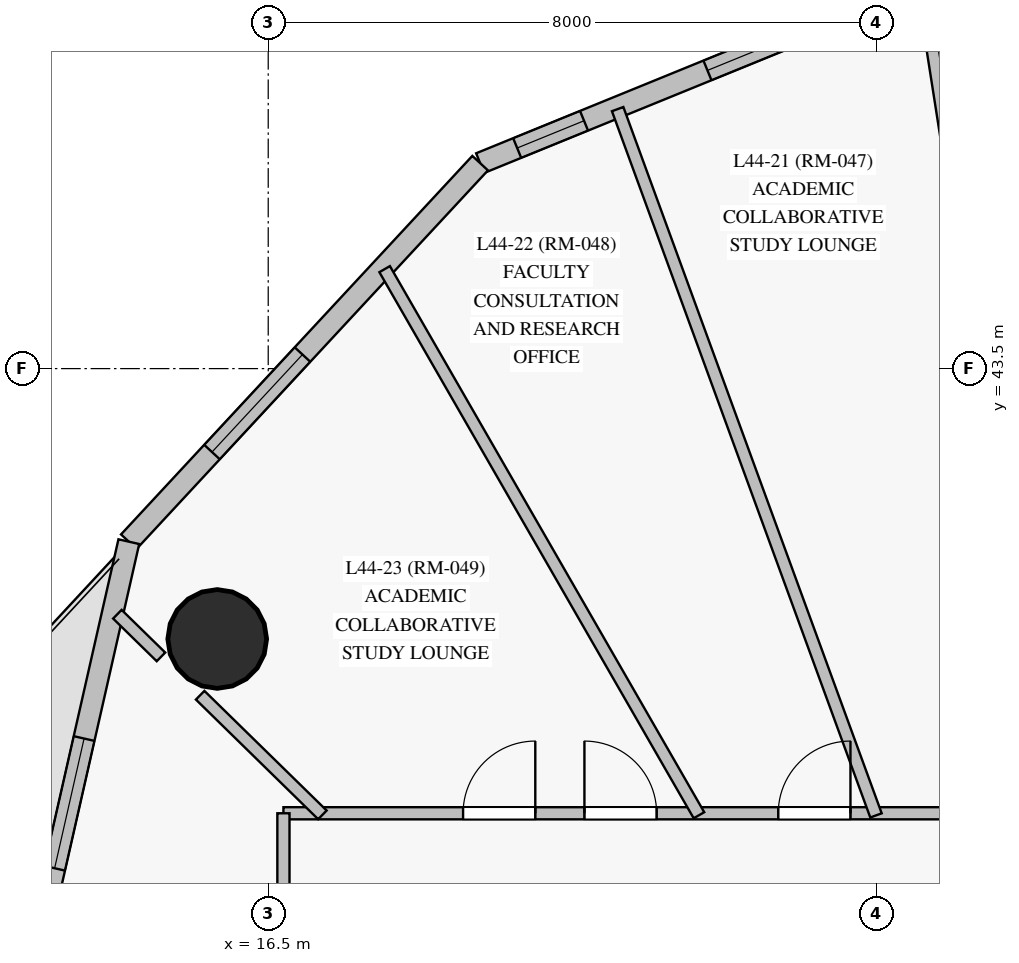
"""IFC4 building model, lengths in metres.
Left out: names, types, materials, properties, quantities, classifications, styles, units other than length and angle.
Written with IfcOpenShell. Run it as: python <this file> out.ifc"""

import sys

from ifc_helpers import new_model, si_unit, direction, frame, frame_2d, origin, origin_with_axes, origin_2d, place, context, subcontext, project, spatial, rectangle, circle, extrude, source, transform, mapped, element, fill, save


model = new_model("IFC4")
c1 = context("Model", 3, precision=1e-05, world=origin(), true_north=direction((0.0, 1.0)))
c2 = subcontext(c1, "Body", "Model", "MODEL_VIEW")
j1 = project(units=[si_unit("LENGTHUNIT", "METRE"), si_unit("PLANEANGLEUNIT", "RADIAN")], contexts=[c1])
p1 = place(None, origin())
s1 = spatial("IfcSite", under=j1, at=p1, CompositionType="ELEMENT")
p2 = place(p1, origin())
s2 = spatial("IfcBuilding", under=s1, at=p2, CompositionType="ELEMENT")
p3 = place(p2, frame((0.0, 0.0, 156.55)))
s3 = spatial("IfcBuildingStorey", under=s2, at=p3, CompositionType="ELEMENT", Elevation=156.55)
m1 = source(origin_with_axes(), c2, "Body", "SweptSolid", [
    extrude(circle(Radius=0.65, at=origin_2d()), origin(), (0.0, 0.0, 1.0), 3.05),
])
p4 = place(p3, frame((15.829, 39.943, 0.0), z_axis=(0.0, 0.0, 1.0), x_axis=(1.0, 0.0, 0.0)))
e1 = element("IfcColumn", 1, at=p4, inside=s3, PredefinedType="COLUMN", context=c2, shape_type="MappedRepresentation", body=[
    mapped(m1, transform((0.0, 0.0, 0.0), scale=1.0)),
])
p5 = place(p3, frame((28.053, 49.778, 0.0), z_axis=(0.0, 0.0, 1.0), x_axis=(-0.925936748152, -0.377678617903, 0.0)))
e2 = element("IfcWall", 2, at=p5, inside=s3, PredefinedType="SOLIDWALL", context=c2, shape_type="SweptSolid", body=[
    extrude(rectangle(XDim=9.466, YDim=0.28, at=frame_2d((4.733, 0.0))), origin(), (0.0, 0.0, 1.0), 2.825),
])
p6 = place(p5, frame((0.754, 0.0, 0.85)))
e3 = element("IfcOpeningElement", 3, at=p6, cuts=e2, PredefinedType="OPENING", context=c2, shape_type="SweptSolid", body=[
    extrude(rectangle(XDim=1.75, YDim=1.65, at=frame_2d((0.875, 0.825))), frame((0.0, 0.15, 0.0), z_axis=(0.0, -1.0, 0.0), x_axis=(1.0, 0.0, 0.0)), (0.0, 0.0, 1.0), 0.3),
])
p7 = place(p5, frame((4.486, 0.0, 0.85)))
e4 = element("IfcOpeningElement", 4, at=p7, cuts=e2, PredefinedType="OPENING", context=c2, shape_type="SweptSolid", body=[
    extrude(rectangle(XDim=1.75, YDim=1.65, at=frame_2d((0.875, 0.825))), frame((0.0, 0.15, 0.0), z_axis=(0.0, -1.0, 0.0), x_axis=(1.0, 0.0, 0.0)), (0.0, 0.0, 1.0), 0.3),
])
p8 = place(p5, frame((7.99, 0.0, 0.85)))
e5 = element("IfcOpeningElement", 5, at=p8, cuts=e2, PredefinedType="OPENING", context=c2, shape_type="SweptSolid", body=[
    extrude(rectangle(XDim=0.95, YDim=1.5, at=frame_2d((0.475, 0.75))), frame((0.0, 0.15, 0.0), z_axis=(0.0, -1.0, 0.0), x_axis=(1.0, 0.0, 0.0)), (0.0, 0.0, 1.0), 0.3),
])
p9 = place(p3, frame((19.288, 46.203, 0.0), z_axis=(0.0, 0.0, 1.0), x_axis=(-0.680295338819, -0.7329380956, 0.0)))
e6 = element("IfcWall", 6, at=p9, inside=s3, PredefinedType="SOLIDWALL", context=c2, shape_type="SweptSolid", body=[
    extrude(rectangle(XDim=6.794, YDim=0.28, at=frame_2d((3.397, 0.0))), origin(), (0.0, 0.0, 1.0), 2.825),
])
p10 = place(p9, frame((3.436, 0.0, 0.85)))
e7 = element("IfcOpeningElement", 7, at=p10, cuts=e6, PredefinedType="OPENING", context=c2, shape_type="SweptSolid", body=[
    extrude(rectangle(XDim=1.75, YDim=1.65, at=frame_2d((0.875, 0.825))), frame((0.0, 0.15, 0.0), z_axis=(0.0, -1.0, 0.0), x_axis=(1.0, 0.0, 0.0)), (0.0, 0.0, 1.0), 0.3),
])
p11 = place(p3, frame((14.666, 41.223, 0.0), z_axis=(0.0, 0.0, 1.0), x_axis=(-0.221558962352, -0.975146976718, 0.0)))
e8 = element("IfcWall", 8, at=p11, inside=s3, PredefinedType="SOLIDWALL", context=c2, shape_type="SweptSolid", body=[
    extrude(rectangle(XDim=22.585, YDim=0.28, at=frame_2d((11.292, 0.0))), origin(), (0.0, 0.0, 1.0), 2.825),
])
p12 = place(p11, frame((2.656, 0.0, 0.85)))
e9 = element("IfcOpeningElement", 9, at=p12, cuts=e8, PredefinedType="OPENING", context=c2, shape_type="SweptSolid", body=[
    extrude(rectangle(XDim=1.75, YDim=1.65, at=frame_2d((0.875, 0.825))), frame((0.0, 0.15, 0.0), z_axis=(0.0, -1.0, 0.0), x_axis=(1.0, 0.0, 0.0)), (0.0, 0.0, 1.0), 0.3),
])
p13 = place(p11, frame((7.15, 0.0, 0.85)))
e10 = element("IfcOpeningElement", 10, at=p13, cuts=e8, PredefinedType="OPENING", context=c2, shape_type="SweptSolid", body=[
    extrude(rectangle(XDim=1.75, YDim=1.65, at=frame_2d((0.875, 0.825))), frame((0.0, 0.15, 0.0), z_axis=(0.0, -1.0, 0.0), x_axis=(1.0, 0.0, 0.0)), (0.0, 0.0, 1.0), 0.3),
])
p14 = place(p11, frame((11.643, 0.0, 0.85)))
e11 = element("IfcOpeningElement", 11, at=p14, cuts=e8, PredefinedType="OPENING", context=c2, shape_type="SweptSolid", body=[
    extrude(rectangle(XDim=1.75, YDim=1.65, at=frame_2d((0.875, 0.825))), frame((0.0, 0.15, 0.0), z_axis=(0.0, -1.0, 0.0), x_axis=(1.0, 0.0, 0.0)), (0.0, 0.0, 1.0), 0.3),
])
p15 = place(p11, frame((17.93, 0.0, 0.85)))
e12 = element("IfcOpeningElement", 12, at=p15, cuts=e8, PredefinedType="OPENING", context=c2, shape_type="SweptSolid", body=[
    extrude(rectangle(XDim=1.75, YDim=1.65, at=frame_2d((0.875, 0.825))), frame((0.0, 0.15, 0.0), z_axis=(0.0, -1.0, 0.0), x_axis=(1.0, 0.0, 0.0)), (0.0, 0.0, 1.0), 0.3),
])
p16 = place(p11, frame((9.826, 0.0, 0.0)))
e13 = element("IfcOpeningElement", 13, at=p16, cuts=e8, PredefinedType="OPENING", context=c2, shape_type="SweptSolid", body=[
    extrude(rectangle(XDim=1.05, YDim=2.12, at=frame_2d((0.525, 1.06))), frame((0.0, 0.15, 0.0), z_axis=(0.0, -1.0, 0.0), x_axis=(1.0, 0.0, 0.0)), (0.0, 0.0, 1.0), 0.3),
])
p17 = place(p3, frame((16.7, 37.65, 0.0), z_axis=(0.0, 0.0, 1.0), x_axis=(1.0, 0.0, 0.0)))
e14 = element("IfcWall", 14, at=p17, inside=s3, PredefinedType="PARTITIONING", context=c2, shape_type="SweptSolid", body=[
    extrude(rectangle(XDim=23.5, YDim=0.16, at=frame_2d((11.75, 0.0))), origin(), (0.0, 0.0, 1.0), 2.375),
])
p18 = place(p17, frame((21.26, 0.0, 0.0)))
e15 = element("IfcOpeningElement", 15, at=p18, cuts=e14, PredefinedType="OPENING", context=c2, shape_type="SweptSolid", body=[
    extrude(rectangle(XDim=0.95, YDim=2.15, at=frame_2d((0.475, 1.075))), frame((0.0, 0.09, 0.0), z_axis=(0.0, -1.0, 0.0), x_axis=(1.0, 0.0, 0.0)), (0.0, 0.0, 1.0), 0.18),
])
p19 = place(p17, frame((17.365, 0.0, 0.0)))
e16 = element("IfcOpeningElement", 16, at=p19, cuts=e14, PredefinedType="OPENING", context=c2, shape_type="SweptSolid", body=[
    extrude(rectangle(XDim=0.86, YDim=2.1, at=frame_2d((0.43, 1.05))), frame((0.0, 0.09, 0.0), z_axis=(0.0, -1.0, 0.0), x_axis=(1.0, 0.0, 0.0)), (0.0, 0.0, 1.0), 0.18),
])
p20 = place(p17, frame((15.16, 0.0, 0.0)))
e17 = element("IfcOpeningElement", 17, at=p20, cuts=e14, PredefinedType="OPENING", context=c2, shape_type="SweptSolid", body=[
    extrude(rectangle(XDim=0.95, YDim=2.15, at=frame_2d((0.475, 1.075))), frame((0.0, 0.09, 0.0), z_axis=(0.0, -1.0, 0.0), x_axis=(1.0, 0.0, 0.0)), (0.0, 0.0, 1.0), 0.18),
])
p21 = place(p17, frame((13.06, 0.0, 0.0)))
e18 = element("IfcOpeningElement", 18, at=p21, cuts=e14, PredefinedType="OPENING", context=c2, shape_type="SweptSolid", body=[
    extrude(rectangle(XDim=0.95, YDim=2.15, at=frame_2d((0.475, 1.075))), frame((0.0, 0.09, 0.0), z_axis=(0.0, -1.0, 0.0), x_axis=(1.0, 0.0, 0.0)), (0.0, 0.0, 1.0), 0.18),
])
p22 = place(p17, frame((10.973, 0.0, 0.0)))
e19 = element("IfcOpeningElement", 19, at=p22, cuts=e14, PredefinedType="OPENING", context=c2, shape_type="SweptSolid", body=[
    extrude(rectangle(XDim=0.95, YDim=2.15, at=frame_2d((0.475, 1.075))), frame((0.0, 0.09, 0.0), z_axis=(0.0, -1.0, 0.0), x_axis=(1.0, 0.0, 0.0)), (0.0, 0.0, 1.0), 0.18),
])
p23 = place(p17, frame((8.885, 0.0, 0.0)))
e20 = element("IfcOpeningElement", 20, at=p23, cuts=e14, PredefinedType="OPENING", context=c2, shape_type="SweptSolid", body=[
    extrude(rectangle(XDim=0.95, YDim=2.15, at=frame_2d((0.475, 1.075))), frame((0.0, 0.09, 0.0), z_axis=(0.0, -1.0, 0.0), x_axis=(1.0, 0.0, 0.0)), (0.0, 0.0, 1.0), 0.18),
])
p24 = place(p17, frame((6.51, 0.0, 0.0)))
e21 = element("IfcOpeningElement", 21, at=p24, cuts=e14, PredefinedType="OPENING", context=c2, shape_type="SweptSolid", body=[
    extrude(rectangle(XDim=0.95, YDim=2.15, at=frame_2d((0.475, 1.075))), frame((0.0, 0.09, 0.0), z_axis=(0.0, -1.0, 0.0), x_axis=(1.0, 0.0, 0.0)), (0.0, 0.0, 1.0), 0.18),
])
p25 = place(p17, frame((3.96, 0.0, 0.0)))
e22 = element("IfcOpeningElement", 22, at=p25, cuts=e14, PredefinedType="OPENING", context=c2, shape_type="SweptSolid", body=[
    extrude(rectangle(XDim=0.95, YDim=2.15, at=frame_2d((0.475, 1.075))), frame((0.0, 0.09, 0.0), z_axis=(0.0, -1.0, 0.0), x_axis=(1.0, 0.0, 0.0)), (0.0, 0.0, 1.0), 0.18),
])
p26 = place(p17, frame((2.364, 0.0, 0.0)))
e23 = element("IfcOpeningElement", 23, at=p26, cuts=e14, PredefinedType="OPENING", context=c2, shape_type="SweptSolid", body=[
    extrude(rectangle(XDim=0.95, YDim=2.15, at=frame_2d((0.475, 1.075))), frame((0.0, 0.09, 0.0), z_axis=(0.0, -1.0, 0.0), x_axis=(1.0, 0.0, 0.0)), (0.0, 0.0, 1.0), 0.18),
])
p27 = place(p3, frame((16.7, 15.35, 0.0), z_axis=(0.0, 0.0, 1.0), x_axis=(0.0, 1.0, 0.0)))
e24 = element("IfcWall", 24, at=p27, inside=s3, PredefinedType="PARTITIONING", context=c2, shape_type="SweptSolid", body=[
    extrude(rectangle(XDim=22.3, YDim=0.16, at=frame_2d((11.15, 0.0))), origin(), (0.0, 0.0, 1.0), 2.275),
])
p28 = place(p27, frame((7.33, 0.0, 0.0)))
e25 = element("IfcOpeningElement", 25, at=p28, cuts=e24, PredefinedType="OPENING", context=c2, shape_type="SweptSolid", body=[
    extrude(rectangle(XDim=0.95, YDim=2.15, at=frame_2d((0.475, 1.075))), frame((0.0, 0.09, 0.0), z_axis=(0.0, -1.0, 0.0), x_axis=(1.0, 0.0, 0.0)), (0.0, 0.0, 1.0), 0.18),
])
p29 = place(p27, frame((5.1, 0.0, 0.0)))
e26 = element("IfcOpeningElement", 26, at=p29, cuts=e24, PredefinedType="OPENING", context=c2, shape_type="SweptSolid", body=[
    extrude(rectangle(XDim=0.96, YDim=2.15, at=frame_2d((0.48, 1.075))), frame((0.0, 0.09, 0.0), z_axis=(0.0, -1.0, 0.0), x_axis=(1.0, 0.0, 0.0)), (0.0, 0.0, 1.0), 0.18),
])
p30 = place(p27, frame((1.328, 0.0, 0.0)))
e27 = element("IfcOpeningElement", 27, at=p30, cuts=e24, PredefinedType="OPENING", context=c2, shape_type="SweptSolid", body=[
    extrude(rectangle(XDim=0.95, YDim=2.15, at=frame_2d((0.475, 1.075))), frame((0.0, 0.09, 0.0), z_axis=(0.0, -1.0, 0.0), x_axis=(1.0, 0.0, 0.0)), (0.0, 0.0, 1.0), 0.18),
])
p31 = place(p27, frame((14.02, 0.0, 0.0)))
e28 = element("IfcOpeningElement", 28, at=p31, cuts=e24, PredefinedType="OPENING", context=c2, shape_type="SweptSolid", body=[
    extrude(rectangle(XDim=0.95, YDim=2.15, at=frame_2d((0.475, 1.075))), frame((0.0, 0.09, 0.0), z_axis=(0.0, -1.0, 0.0), x_axis=(1.0, 0.0, 0.0)), (0.0, 0.0, 1.0), 0.18),
])
p32 = place(p3, frame((26.822, 37.606, 0.0), z_axis=(0.0, 0.0, 1.0), x_axis=(-0.154668693612, 0.987966393769, 0.0)))
e29 = element("IfcWall", 29, at=p32, inside=s3, PredefinedType="PARTITIONING", context=c2, shape_type="SweptSolid", body=[
    extrude(rectangle(XDim=11.076, YDim=0.16, at=frame_2d((5.538, 0.0))), origin(), (0.0, 0.0, 1.0), 2.275),
])
p33 = place(p3, frame((24.496, 37.622, 0.0), z_axis=(0.0, 0.0, 1.0), x_axis=(-0.343499789381, 0.939152753654, 0.0)))
e30 = element("IfcWall", 30, at=p33, inside=s3, PredefinedType="PARTITIONING", context=c2, shape_type="SweptSolid", body=[
    extrude(rectangle(XDim=9.894, YDim=0.16, at=frame_2d((4.947, 0.0))), origin(), (0.0, 0.0, 1.0), 2.825),
])
p34 = place(p3, frame((22.167, 37.624, 0.0), z_axis=(0.0, 0.0, 1.0), x_axis=(-0.498845132143, 0.866691141144, 0.0)))
e31 = element("IfcWall", 31, at=p34, inside=s3, PredefinedType="PARTITIONING", context=c2, shape_type="SweptSolid", body=[
    extrude(rectangle(XDim=8.29, YDim=0.16, at=frame_2d((4.145, 0.0))), origin(), (0.0, 0.0, 1.0), 2.825),
])
p35 = place(p3, frame((17.213, 37.629, 0.0), z_axis=(0.0, 0.0, 1.0), x_axis=(-0.71471376476, 0.699417067609, 0.0)))
e32 = element("IfcWall", 32, at=p35, inside=s3, PredefinedType="PARTITIONING", context=c2, shape_type="SweptSolid", body=[
    extrude(rectangle(XDim=2.25, YDim=0.16, at=frame_2d((1.125, 0.0))), origin(), (0.0, 0.0, 1.0), 2.275),
])
p36 = place(p3, frame((15.089, 39.707, 0.0), z_axis=(0.0, 0.0, 1.0), x_axis=(-0.714817505013, 0.699311042761, 0.0)))
e33 = element("IfcWall", 33, at=p36, inside=s3, PredefinedType="PARTITIONING", context=c2, shape_type="SweptSolid", body=[
    extrude(rectangle(XDim=0.803, YDim=0.16, at=frame_2d((0.401, 0.0))), origin(), (0.0, 0.0, 1.0), 2.825),
])
m2 = source(origin_with_axes(), c2, "Body", "SweptSolid", [
    extrude(rectangle(XDim=1.75, YDim=1.65, at=frame_2d((0.875, 0.825))), frame((0.0, 0.03, 0.0), z_axis=(0.0, -1.0, 0.0), x_axis=(1.0, 0.0, 0.0)), (0.0, 0.0, 1.0), 0.06),
])
p37 = place(p7, origin())
e34 = element("IfcWindow", 34, at=p37, inside=s3, PartitioningType="SINGLE_PANEL", PredefinedType="WINDOW", context=c2, shape_type="MappedRepresentation", body=[
    mapped(m2, transform((0.0, 0.0, 0.0), scale=1.0)),
])
fill(e4, e34)
m3 = source(origin_with_axes(), c2, "Body", "SweptSolid", [
    extrude(rectangle(XDim=0.95, YDim=1.5, at=frame_2d((0.475, 0.75))), frame((0.0, 0.03, 0.0), z_axis=(0.0, -1.0, 0.0), x_axis=(1.0, 0.0, 0.0)), (0.0, 0.0, 1.0), 0.06),
])
p38 = place(p8, origin())
e35 = element("IfcWindow", 35, at=p38, inside=s3, PartitioningType="SINGLE_PANEL", PredefinedType="WINDOW", context=c2, shape_type="MappedRepresentation", body=[
    mapped(m3, transform((0.0, 0.0, 0.0), scale=1.0)),
])
fill(e5, e35)
p39 = place(p10, origin())
e36 = element("IfcWindow", 36, at=p39, inside=s3, PartitioningType="SINGLE_PANEL", PredefinedType="WINDOW", context=c2, shape_type="MappedRepresentation", body=[
    mapped(m2, transform((0.0, 0.0, 0.0), scale=1.0)),
])
fill(e7, e36)
p40 = place(p12, origin())
e37 = element("IfcWindow", 37, at=p40, inside=s3, PartitioningType="SINGLE_PANEL", PredefinedType="WINDOW", context=c2, shape_type="MappedRepresentation", body=[
    mapped(m2, transform((0.0, 0.0, 0.0), scale=1.0)),
])
fill(e9, e37)
m4 = source(origin_with_axes(), c2, "Body", "SweptSolid", [
    extrude(rectangle(XDim=0.95, YDim=2.15, at=frame_2d((0.475, 1.075))), frame((0.0, 0.025, 0.0), z_axis=(0.0, -1.0, 0.0), x_axis=(1.0, 0.0, 0.0)), (0.0, 0.0, 1.0), 0.05),
])
p41 = place(p24, origin())
e38 = element("IfcDoor", 38, at=p41, inside=s3, OperationType="SINGLE_SWING_RIGHT", PredefinedType="DOOR", context=c2, shape_type="MappedRepresentation", body=[
    mapped(m4, transform((0.0, 0.0, 0.0), scale=1.0)),
])
fill(e21, e38)
p42 = place(p25, origin())
e39 = element("IfcDoor", 39, at=p42, inside=s3, OperationType="SINGLE_SWING_LEFT", PredefinedType="DOOR", context=c2, shape_type="MappedRepresentation", body=[
    mapped(m4, transform((0.0, 0.0, 0.0), scale=1.0)),
])
fill(e22, e39)
p43 = place(p26, origin())
e40 = element("IfcDoor", 40, at=p43, inside=s3, OperationType="SINGLE_SWING_RIGHT", PredefinedType="DOOR", context=c2, shape_type="MappedRepresentation", body=[
    mapped(m4, transform((0.0, 0.0, 0.0), scale=1.0)),
])
fill(e23, e40)
save(model, sys.argv[1])
